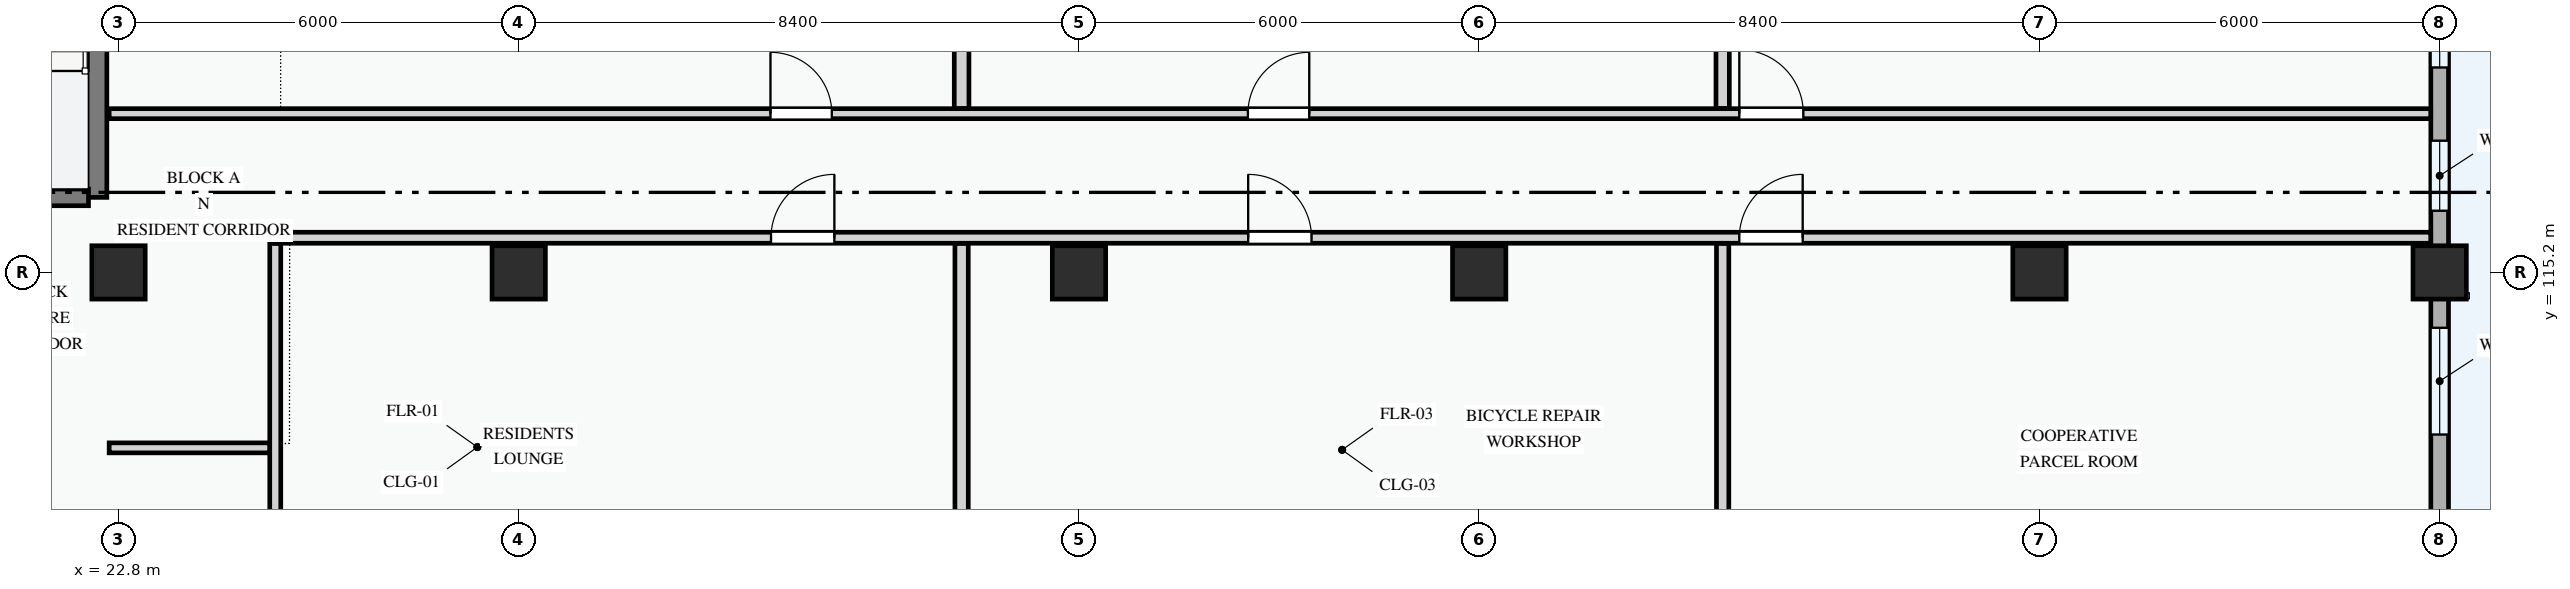
"""IFC4 building model, lengths in metres.
Left out: names, types, materials, properties, quantities, classifications, styles, units other than length and angle.
Written with IfcOpenShell. Run it as: python <this file> out.ifc"""

import sys

from ifc_helpers import new_model, si_unit, direction, frame, frame_2d, origin, origin_2d, place, context, subcontext, project, spatial, rectangle, extrude, element, fill, save


model = new_model("IFC4")
c1 = context("Model", 3, precision=1e-05, world=origin(), true_north=direction((0.0, 1.0)))
c2 = subcontext(c1, "Body", "Model", "MODEL_VIEW")
j1 = project(units=[si_unit("LENGTHUNIT", "METRE"), si_unit("PLANEANGLEUNIT", "RADIAN")], contexts=[c1])
p1 = place(None, origin())
s1 = spatial("IfcSite", under=j1, at=p1, CompositionType="ELEMENT")
p2 = place(p1, origin())
s2 = spatial("IfcBuilding", under=s1, at=p2, CompositionType="ELEMENT")
p3 = place(p2, origin())
s3 = spatial("IfcBuildingStorey", under=s2, at=p3, CompositionType="ELEMENT", Elevation=0.0)
for number, where, z_axis, x_axis in (
    (1, (22.8, 115.2, 0.0), (0.0, 0.0, 1.0), (1.0, 0.0, 0.0)),
    (2, (28.8, 115.2, 0.0), (0.0, 0.0, 1.0), (1.0, 0.0, 0.0)),
    (3, (37.2, 115.2, 0.0), (0.0, 0.0, 1.0), (1.0, 0.0, 0.0)),
    (4, (43.2, 115.2, 0.0), (0.0, 0.0, 1.0), (1.0, 0.0, 0.0)),
    (5, (51.6, 115.2, 0.0), (0.0, 0.0, 1.0), (1.0, 0.0, 0.0)),
    (6, (57.6, 115.2, 0.0), (0.0, 0.0, 1.0), (1.0, 0.0, 0.0)),
):
    element("IfcColumn", number, at=place(p3, frame(where, z_axis=z_axis, x_axis=x_axis)), inside=s3, PredefinedType="COLUMN", context=c2, shape_type="SweptSolid", body=[
        extrude(rectangle(XDim=0.8, YDim=0.8, at=origin_2d()), origin(), (0.0, 0.0, 1.0), 4.5),
    ])
p4 = place(p3, frame((57.6, 109.2, 0.0), z_axis=(0.0, 0.0, 1.0), x_axis=(0.0, 1.0, 0.0)))
e7 = element("IfcWall", 7, at=p4, inside=s3, PredefinedType="STANDARD", context=c2, shape_type="SweptSolid", body=[
    extrude(rectangle(XDim=6.0, YDim=0.265, at=frame_2d((3.0, 0.0))), origin(), (0.0, 0.0, 1.0), 3.585),
])
p5 = place(p4, frame((0.955, 0.0, 0.78)))
e8 = element("IfcOpeningElement", 8, at=p5, cuts=e7, PredefinedType="OPENING", context=c2, shape_type="SweptSolid", body=[
    extrude(rectangle(XDim=1.35, YDim=1.55, at=frame_2d((0.675, 0.775))), frame((0.0, 0.143, 0.0), z_axis=(0.0, -1.0, 0.0), x_axis=(1.0, 0.0, 0.0)), (0.0, 0.0, 1.0), 0.285),
])
p6 = place(p4, frame((3.57, 0.0, 0.78)))
e9 = element("IfcOpeningElement", 9, at=p6, cuts=e7, PredefinedType="OPENING", context=c2, shape_type="SweptSolid", body=[
    extrude(rectangle(XDim=1.6, YDim=1.75, at=frame_2d((0.8, 0.875))), frame((0.0, 0.143, 0.0), z_axis=(0.0, -1.0, 0.0), x_axis=(1.0, 0.0, 0.0)), (0.0, 0.0, 1.0), 0.285),
])
p7 = place(p3, frame((57.6, 115.2, 0.0), z_axis=(0.0, 0.0, 1.0), x_axis=(0.0, 1.0, 0.0)))
e10 = element("IfcWall", 10, at=p7, inside=s3, PredefinedType="STANDARD", context=c2, shape_type="SweptSolid", body=[
    extrude(rectangle(XDim=8.4, YDim=0.265, at=frame_2d((4.2, 0.0))), origin(), (0.0, 0.0, 1.0), 3.485),
])
p8 = place(p7, frame((0.925, 0.0, 0.78)))
e11 = element("IfcOpeningElement", 11, at=p8, cuts=e10, PredefinedType="OPENING", context=c2, shape_type="SweptSolid", body=[
    extrude(rectangle(XDim=1.05, YDim=1.2, at=frame_2d((0.525, 0.6))), frame((0.0, 0.143, 0.0), z_axis=(0.0, -1.0, 0.0), x_axis=(1.0, 0.0, 0.0)), (0.0, 0.0, 1.0), 0.285),
])
p9 = place(p7, frame((3.073, 0.0, 0.78)))
e12 = element("IfcOpeningElement", 12, at=p9, cuts=e10, PredefinedType="OPENING", context=c2, shape_type="SweptSolid", body=[
    extrude(rectangle(XDim=1.6, YDim=1.55, at=frame_2d((0.8, 0.775))), frame((0.0, 0.143, 0.0), z_axis=(0.0, -1.0, 0.0), x_axis=(1.0, 0.0, 0.0)), (0.0, 0.0, 1.0), 0.285),
])
p10 = place(p7, frame((5.792, 0.0, 0.78)))
e13 = element("IfcOpeningElement", 13, at=p10, cuts=e10, PredefinedType="OPENING", context=c2, shape_type="SweptSolid", body=[
    extrude(rectangle(XDim=1.85, YDim=1.6, at=frame_2d((0.925, 0.8))), frame((0.0, 0.143, 0.0), z_axis=(0.0, -1.0, 0.0), x_axis=(1.0, 0.0, 0.0)), (0.0, 0.0, 1.0), 0.285),
])
p11 = place(p3, frame((22.475, 123.25, 0.0), z_axis=(0.0, 0.0, 1.0), x_axis=(0.0, -1.0, 0.0)))
e14 = element("IfcWall", 14, at=p11, inside=s3, PredefinedType="SHEAR", context=c2, shape_type="SweptSolid", body=[
    extrude(rectangle(XDim=6.925, YDim=0.3, at=frame_2d((3.462, 0.0))), origin(), (0.0, 0.0, 1.0), 4.2),
])
p12 = place(p3, frame((8.85, 116.325, 0.0), z_axis=(0.0, 0.0, 1.0), x_axis=(1.0, 0.0, 0.0)))
e15 = element("IfcWall", 15, at=p12, inside=s3, PredefinedType="SHEAR", context=c2, shape_type="SweptSolid", body=[
    extrude(rectangle(XDim=13.5, YDim=0.25, at=frame_2d((6.75, 0.0))), origin(), (0.0, 0.0, 1.0), 4.2),
])
p13 = place(p12, frame((6.2, 0.0, 0.0)))
e16 = element("IfcOpeningElement", 16, at=p13, cuts=e15, PredefinedType="OPENING", context=c2, shape_type="SweptSolid", body=[
    extrude(rectangle(XDim=1.1, YDim=2.15, at=frame_2d((0.55, 1.075))), frame((0.0, 0.135, 0.0), z_axis=(0.0, -1.0, 0.0), x_axis=(1.0, 0.0, 0.0)), (0.0, 0.0, 1.0), 0.27),
])
p14 = place(p3, frame((25.15, 109.334, 0.0), z_axis=(0.0, 0.0, 1.0), x_axis=(0.0, 1.0, 0.0)))
e17 = element("IfcWall", 17, at=p14, inside=s3, PredefinedType="PARTITIONING", context=c2, shape_type="SweptSolid", body=[
    extrude(rectangle(XDim=6.301, YDim=0.165, at=frame_2d((3.15, 0.0))), origin(), (0.0, 0.0, 1.0), 4.2),
])
p15 = place(p3, frame((22.66, 112.57, 0.0), z_axis=(0.0, 0.0, 1.0), x_axis=(1.0, 0.0, 0.0)))
e18 = element("IfcWall", 18, at=p15, inside=s3, PredefinedType="PARTITIONING", context=c2, shape_type="SweptSolid", body=[
    extrude(rectangle(XDim=2.406, YDim=0.15, at=frame_2d((1.203, 0.0))), origin(), (0.0, 0.0, 1.0), 4.2),
])
p16 = place(p3, frame((35.44, 109.334, 0.0), z_axis=(0.0, 0.0, 1.0), x_axis=(0.0, 1.0, 0.0)))
e19 = element("IfcWall", 19, at=p16, inside=s3, PredefinedType="PARTITIONING", context=c2, shape_type="SweptSolid", body=[
    extrude(rectangle(XDim=6.301, YDim=0.2, at=frame_2d((3.15, 0.0))), origin(), (0.0, 0.0, 1.0), 4.2),
])
p17 = place(p3, frame((35.44, 117.657, 0.0), z_axis=(0.0, 0.0, 1.0), x_axis=(0.0, 1.0, 0.0)))
e20 = element("IfcWall", 20, at=p17, inside=s3, PredefinedType="PARTITIONING", context=c2, shape_type="SweptSolid", body=[
    extrude(rectangle(XDim=5.809, YDim=0.22, at=frame_2d((2.904, 0.0))), origin(), (0.0, 0.0, 1.0), 4.2),
])
p18 = place(p3, frame((46.85, 109.334, 0.0), z_axis=(0.0, 0.0, 1.0), x_axis=(0.0, 1.0, 0.0)))
e21 = element("IfcWall", 21, at=p18, inside=s3, PredefinedType="PARTITIONING", context=c2, shape_type="SweptSolid", body=[
    extrude(rectangle(XDim=6.301, YDim=0.185, at=frame_2d((3.15, 0.0))), origin(), (0.0, 0.0, 1.0), 4.2),
])
p19 = place(p3, frame((46.85, 117.657, 0.0), z_axis=(0.0, 0.0, 1.0), x_axis=(0.0, 1.0, 0.0)))
e22 = element("IfcWall", 22, at=p19, inside=s3, PredefinedType="PARTITIONING", context=c2, shape_type="SweptSolid", body=[
    extrude(rectangle(XDim=5.809, YDim=0.2, at=frame_2d((2.904, 0.0))), origin(), (0.0, 0.0, 1.0), 4.2),
])
p20 = place(p3, frame((25.15, 115.72, 0.0), z_axis=(0.0, 0.0, 1.0), x_axis=(1.0, 0.0, 0.0)))
e23 = element("IfcWall", 23, at=p20, inside=s3, PredefinedType="PARTITIONING", context=c2, shape_type="SweptSolid", body=[
    extrude(rectangle(XDim=32.316, YDim=0.165, at=frame_2d((16.158, 0.0))), origin(), (0.0, 0.0, 1.0), 4.2),
])
p21 = place(p20, frame((7.433, 0.0, 0.0)))
e24 = element("IfcOpeningElement", 24, at=p21, cuts=e23, PredefinedType="OPENING", context=c2, shape_type="SweptSolid", body=[
    extrude(rectangle(XDim=0.95, YDim=2.1, at=frame_2d((0.475, 1.05))), frame((0.0, 0.093, 0.0), z_axis=(0.0, -1.0, 0.0), x_axis=(1.0, 0.0, 0.0)), (0.0, 0.0, 1.0), 0.185),
])
p22 = place(p20, frame((14.586, 0.0, 0.0)))
e25 = element("IfcOpeningElement", 25, at=p22, cuts=e23, PredefinedType="OPENING", context=c2, shape_type="SweptSolid", body=[
    extrude(rectangle(XDim=0.95, YDim=2.1, at=frame_2d((0.475, 1.05))), frame((0.0, 0.093, 0.0), z_axis=(0.0, -1.0, 0.0), x_axis=(1.0, 0.0, 0.0)), (0.0, 0.0, 1.0), 0.185),
])
p23 = place(p20, frame((21.95, 0.0, 0.0)))
e26 = element("IfcOpeningElement", 26, at=p23, cuts=e23, PredefinedType="OPENING", context=c2, shape_type="SweptSolid", body=[
    extrude(rectangle(XDim=0.95, YDim=2.1, at=frame_2d((0.475, 1.05))), frame((0.0, 0.093, 0.0), z_axis=(0.0, -1.0, 0.0), x_axis=(1.0, 0.0, 0.0)), (0.0, 0.0, 1.0), 0.185),
])
p24 = place(p3, frame((22.66, 117.58, 0.0), z_axis=(0.0, 0.0, 1.0), x_axis=(1.0, 0.0, 0.0)))
e27 = element("IfcWall", 27, at=p24, inside=s3, PredefinedType="PARTITIONING", context=c2, shape_type="SweptSolid", body=[
    extrude(rectangle(XDim=34.806, YDim=0.15, at=frame_2d((17.403, 0.0))), origin(), (0.0, 0.0, 1.0), 4.2),
])
p25 = place(p24, frame((9.914, 0.0, 0.0)))
e28 = element("IfcOpeningElement", 28, at=p25, cuts=e27, PredefinedType="OPENING", context=c2, shape_type="SweptSolid", body=[
    extrude(rectangle(XDim=0.92, YDim=2.1, at=frame_2d((0.46, 1.05))), frame((0.0, 0.085, 0.0), z_axis=(0.0, -1.0, 0.0), x_axis=(1.0, 0.0, 0.0)), (0.0, 0.0, 1.0), 0.17),
])
p26 = place(p24, frame((17.072, 0.0, 0.0)))
e29 = element("IfcOpeningElement", 29, at=p26, cuts=e27, PredefinedType="OPENING", context=c2, shape_type="SweptSolid", body=[
    extrude(rectangle(XDim=0.92, YDim=2.1, at=frame_2d((0.46, 1.05))), frame((0.0, 0.085, 0.0), z_axis=(0.0, -1.0, 0.0), x_axis=(1.0, 0.0, 0.0)), (0.0, 0.0, 1.0), 0.17),
])
p27 = place(p24, frame((24.44, 0.0, 0.0)))
e30 = element("IfcOpeningElement", 30, at=p27, cuts=e27, PredefinedType="OPENING", context=c2, shape_type="SweptSolid", body=[
    extrude(rectangle(XDim=0.96, YDim=2.12, at=frame_2d((0.48, 1.06))), frame((0.0, 0.085, 0.0), z_axis=(0.0, -1.0, 0.0), x_axis=(1.0, 0.0, 0.0)), (0.0, 0.0, 1.0), 0.17),
])
p28 = place(p6, origin())
e31 = element("IfcWindow", 31, at=p28, inside=s3, PartitioningType="DOUBLE_PANEL_VERTICAL", PredefinedType="WINDOW", context=c2, shape_type="SweptSolid", body=[
    extrude(rectangle(XDim=1.6, YDim=1.75, at=frame_2d((0.8, 0.875))), frame((0.0, 0.03, 0.0), z_axis=(0.0, -1.0, 0.0), x_axis=(1.0, 0.0, 0.0)), (0.0, 0.0, 1.0), 0.06),
])
fill(e9, e31)
p29 = place(p8, origin())
e32 = element("IfcWindow", 32, at=p29, inside=s3, PartitioningType="SINGLE_PANEL", PredefinedType="WINDOW", context=c2, shape_type="SweptSolid", body=[
    extrude(rectangle(XDim=1.05, YDim=1.2, at=frame_2d((0.525, 0.6))), frame((0.0, 0.03, 0.0), z_axis=(0.0, -1.0, 0.0), x_axis=(1.0, 0.0, 0.0)), (0.0, 0.0, 1.0), 0.06),
])
fill(e11, e32)
p30 = place(p9, origin())
e33 = element("IfcWindow", 33, at=p30, inside=s3, PartitioningType="DOUBLE_PANEL_VERTICAL", PredefinedType="WINDOW", context=c2, shape_type="SweptSolid", body=[
    extrude(rectangle(XDim=1.6, YDim=1.55, at=frame_2d((0.8, 0.775))), frame((0.0, 0.03, 0.0), z_axis=(0.0, -1.0, 0.0), x_axis=(1.0, 0.0, 0.0)), (0.0, 0.0, 1.0), 0.06),
])
fill(e12, e33)
p31 = place(p21, origin())
e34 = element("IfcDoor", 34, at=p31, inside=s3, OperationType="SINGLE_SWING_RIGHT", PredefinedType="DOOR", context=c2, shape_type="SweptSolid", body=[
    extrude(rectangle(XDim=0.95, YDim=2.1, at=frame_2d((0.475, 1.05))), frame((0.0, 0.025, 0.0), z_axis=(0.0, -1.0, 0.0), x_axis=(1.0, 0.0, 0.0)), (0.0, 0.0, 1.0), 0.05),
])
fill(e24, e34)
p32 = place(p22, origin())
e35 = element("IfcDoor", 35, at=p32, inside=s3, OperationType="SINGLE_SWING_LEFT", PredefinedType="DOOR", context=c2, shape_type="SweptSolid", body=[
    extrude(rectangle(XDim=0.95, YDim=2.1, at=frame_2d((0.475, 1.05))), frame((0.0, 0.025, 0.0), z_axis=(0.0, -1.0, 0.0), x_axis=(1.0, 0.0, 0.0)), (0.0, 0.0, 1.0), 0.05),
])
fill(e25, e35)
p33 = place(p23, origin())
e36 = element("IfcDoor", 36, at=p33, inside=s3, OperationType="SINGLE_SWING_RIGHT", PredefinedType="DOOR", context=c2, shape_type="SweptSolid", body=[
    extrude(rectangle(XDim=0.95, YDim=2.1, at=frame_2d((0.475, 1.05))), frame((0.0, 0.025, 0.0), z_axis=(0.0, -1.0, 0.0), x_axis=(1.0, 0.0, 0.0)), (0.0, 0.0, 1.0), 0.05),
])
fill(e26, e36)
p34 = place(p25, origin())
e37 = element("IfcDoor", 37, at=p34, inside=s3, OperationType="SINGLE_SWING_LEFT", PredefinedType="DOOR", context=c2, shape_type="SweptSolid", body=[
    extrude(rectangle(XDim=0.92, YDim=2.1, at=frame_2d((0.46, 1.05))), frame((0.0, 0.025, 0.0), z_axis=(0.0, -1.0, 0.0), x_axis=(1.0, 0.0, 0.0)), (0.0, 0.0, 1.0), 0.05),
])
fill(e28, e37)
p35 = place(p26, origin())
e38 = element("IfcDoor", 38, at=p35, inside=s3, OperationType="SINGLE_SWING_RIGHT", PredefinedType="DOOR", context=c2, shape_type="SweptSolid", body=[
    extrude(rectangle(XDim=0.92, YDim=2.1, at=frame_2d((0.46, 1.05))), frame((0.0, 0.025, 0.0), z_axis=(0.0, -1.0, 0.0), x_axis=(1.0, 0.0, 0.0)), (0.0, 0.0, 1.0), 0.05),
])
fill(e29, e38)
p36 = place(p27, origin())
e39 = element("IfcDoor", 39, at=p36, inside=s3, OperationType="SINGLE_SWING_LEFT", PredefinedType="DOOR", context=c2, shape_type="SweptSolid", body=[
    extrude(rectangle(XDim=0.96, YDim=2.12, at=frame_2d((0.48, 1.06))), frame((0.0, 0.025, 0.0), z_axis=(0.0, -1.0, 0.0), x_axis=(1.0, 0.0, 0.0)), (0.0, 0.0, 1.0), 0.05),
])
fill(e30, e39)
save(model, sys.argv[1])
